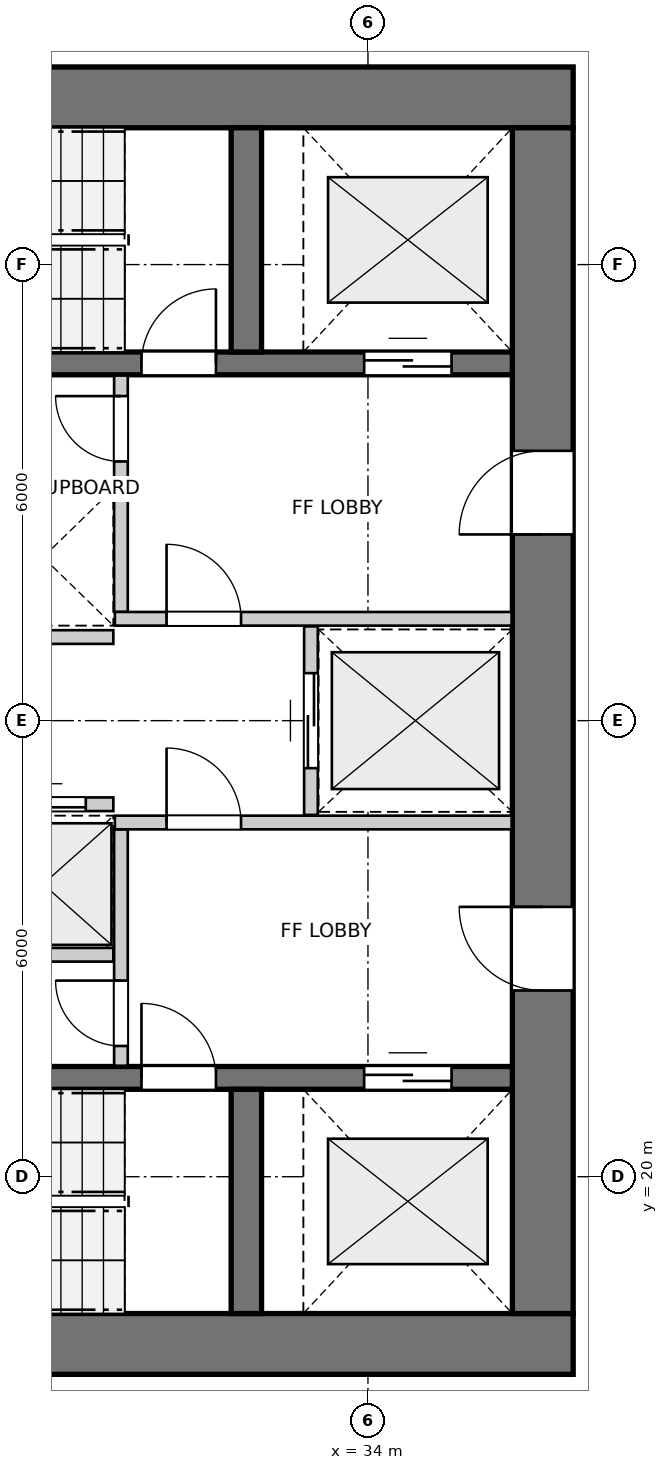
"""IFC4 building model, lengths in metres.
Left out: names, types, materials, properties, quantities, classifications, styles, units other than length and angle.
Written with IfcOpenShell. Run it as: python <this file> out.ifc"""

import sys

from ifc_helpers import new_model, si_unit, direction, frame, frame_2d, origin, place, context, subcontext, project, spatial, rectangle, extrude, source, transform, mapped, element, fill, save


model = new_model("IFC4")
c1 = context("Model", 3, precision=1e-05, world=origin(), true_north=direction((0.0, 1.0)))
c2 = subcontext(c1, "Body", "Model", "MODEL_VIEW")
j1 = project(units=[si_unit("LENGTHUNIT", "METRE"), si_unit("PLANEANGLEUNIT", "RADIAN")], contexts=[c1])
p1 = place(None, origin())
s1 = spatial("IfcSite", under=j1, at=p1, CompositionType="ELEMENT")
p2 = place(p1, origin())
s2 = spatial("IfcBuilding", under=s1, at=p2, CompositionType="ELEMENT")
p3 = place(p2, frame((0.0, 0.0, 17.4)))
s3 = spatial("IfcBuildingStorey", under=s2, at=p3, CompositionType="ELEMENT", Elevation=17.4)
for number, where, z_axis, x_axis in (
    (1, (24.0, 17.8, 0.0), (0.0, 0.0, 1.0), (1.0, 0.0, 0.0)),
    (2, (36.7, 34.2, 0.0), (0.0, 0.0, 1.0), (-1.0, 0.0, 0.0)),
):
    element("IfcWall", number, at=place(p3, frame(where, z_axis=z_axis, x_axis=x_axis)), inside=s3, PredefinedType="SHEAR", context=c2, shape_type="SweptSolid", body=[
        extrude(rectangle(XDim=12.7, YDim=0.8, at=frame_2d((6.35, 0.0))), origin(), (0.0, 0.0, 1.0), 2.94),
    ])
p4 = place(p3, frame((36.3, 18.2, 0.0), z_axis=(0.0, 0.0, 1.0), x_axis=(0.0, 1.0, 0.0)))
e3 = element("IfcWall", 3, at=p4, inside=s3, PredefinedType="SHEAR", context=c2, shape_type="SweptSolid", body=[
    extrude(rectangle(XDim=15.6, YDim=0.8, at=frame_2d((7.8, 0.0))), origin(), (0.0, 0.0, 1.0), 2.94),
])
p5 = place(p4, frame((4.25, 0.0, 0.0)))
e4 = element("IfcOpeningElement", 4, at=p5, cuts=e3, PredefinedType="OPENING", context=c2, shape_type="SweptSolid", body=[
    extrude(rectangle(XDim=1.1, YDim=2.15, at=frame_2d((0.55, 1.075))), frame((0.0, 0.41, 0.0), z_axis=(0.0, -1.0, 0.0), x_axis=(1.0, 0.0, 0.0)), (0.0, 0.0, 1.0), 0.82),
])
p6 = place(p4, frame((10.25, 0.0, 0.0)))
e5 = element("IfcOpeningElement", 5, at=p6, cuts=e3, PredefinedType="OPENING", context=c2, shape_type="SweptSolid", body=[
    extrude(rectangle(XDim=1.1, YDim=2.15, at=frame_2d((0.55, 1.075))), frame((0.0, 0.41, 0.0), z_axis=(0.0, -1.0, 0.0), x_axis=(1.0, 0.0, 0.0)), (0.0, 0.0, 1.0), 0.82),
])
p7 = place(p3, frame((24.8, 21.3, 0.0), z_axis=(0.0, 0.0, 1.0), x_axis=(1.0, 0.0, 0.0)))
e6 = element("IfcWall", 6, at=p7, inside=s3, PredefinedType="SHEAR", context=c2, shape_type="SweptSolid", body=[
    extrude(rectangle(XDim=11.1, YDim=0.3, at=frame_2d((5.55, 0.0))), origin(), (0.0, 0.0, 1.0), 2.94),
])
p8 = place(p7, frame((6.22, 0.0, 0.0)))
e7 = element("IfcOpeningElement", 7, at=p8, cuts=e6, PredefinedType="OPENING", context=c2, shape_type="SweptSolid", body=[
    extrude(rectangle(XDim=0.98, YDim=2.15, at=frame_2d((0.49, 1.075))), frame((0.0, 0.16, 0.0), z_axis=(0.0, -1.0, 0.0), x_axis=(1.0, 0.0, 0.0)), (0.0, 0.0, 1.0), 0.32),
])
p9 = place(p7, frame((9.15, 0.0, 0.0)))
e8 = element("IfcOpeningElement", 8, at=p9, cuts=e6, PredefinedType="OPENING", context=c2, shape_type="SweptSolid", body=[
    extrude(rectangle(XDim=1.15, YDim=2.15, at=frame_2d((0.575, 1.075))), frame((0.0, 0.16, 0.0), z_axis=(0.0, -1.0, 0.0), x_axis=(1.0, 0.0, 0.0)), (0.0, 0.0, 1.0), 0.32),
])
p10 = place(p3, frame((32.4, 18.2, 0.0), z_axis=(0.0, 0.0, 1.0), x_axis=(0.0, 1.0, 0.0)))
e9 = element("IfcWall", 9, at=p10, inside=s3, PredefinedType="SHEAR", context=c2, shape_type="SweptSolid", body=[
    extrude(rectangle(XDim=2.95, YDim=0.4, at=frame_2d((1.475, 0.0))), origin(), (0.0, 0.0, 1.0), 2.94),
])
p11 = place(p3, frame((24.8, 30.7, 0.0), z_axis=(0.0, 0.0, 1.0), x_axis=(1.0, 0.0, 0.0)))
e10 = element("IfcWall", 10, at=p11, inside=s3, PredefinedType="SHEAR", context=c2, shape_type="SweptSolid", body=[
    extrude(rectangle(XDim=11.1, YDim=0.3, at=frame_2d((5.55, 0.0))), origin(), (0.0, 0.0, 1.0), 2.94),
])
p12 = place(p11, frame((6.22, 0.0, 0.0)))
e11 = element("IfcOpeningElement", 11, at=p12, cuts=e10, PredefinedType="OPENING", context=c2, shape_type="SweptSolid", body=[
    extrude(rectangle(XDim=0.98, YDim=2.15, at=frame_2d((0.49, 1.075))), frame((0.0, 0.16, 0.0), z_axis=(0.0, -1.0, 0.0), x_axis=(1.0, 0.0, 0.0)), (0.0, 0.0, 1.0), 0.32),
])
p13 = place(p11, frame((9.15, 0.0, 0.0)))
e12 = element("IfcOpeningElement", 12, at=p13, cuts=e10, PredefinedType="OPENING", context=c2, shape_type="SweptSolid", body=[
    extrude(rectangle(XDim=1.15, YDim=2.15, at=frame_2d((0.575, 1.075))), frame((0.0, 0.16, 0.0), z_axis=(0.0, -1.0, 0.0), x_axis=(1.0, 0.0, 0.0)), (0.0, 0.0, 1.0), 0.32),
])
p14 = place(p3, frame((32.4, 30.85, 0.0), z_axis=(0.0, 0.0, 1.0), x_axis=(0.0, 1.0, 0.0)))
e13 = element("IfcWall", 13, at=p14, inside=s3, PredefinedType="SHEAR", context=c2, shape_type="SweptSolid", body=[
    extrude(rectangle(XDim=2.95, YDim=0.4, at=frame_2d((1.475, 0.0))), origin(), (0.0, 0.0, 1.0), 2.94),
])
p15 = place(p3, frame((30.75, 21.46, 0.0), z_axis=(0.0, 0.0, 1.0), x_axis=(0.0, 1.0, 0.0)))
e14 = element("IfcWall", 14, at=p15, inside=s3, PredefinedType="PARTITIONING", context=c2, shape_type="SweptSolid", body=[
    extrude(rectangle(XDim=3.11, YDim=0.18, at=frame_2d((1.555, 0.0))), origin(), (0.0, 0.0, 1.0), 2.94),
])
p16 = place(p15, frame((0.26, 0.0, 0.0)))
e15 = element("IfcOpeningElement", 15, at=p16, cuts=e14, PredefinedType="OPENING", context=c2, shape_type="SweptSolid", body=[
    extrude(rectangle(XDim=0.86, YDim=2.05, at=frame_2d((0.43, 1.025))), frame((0.0, 0.1, 0.0), z_axis=(0.0, -1.0, 0.0), x_axis=(1.0, 0.0, 0.0)), (0.0, 0.0, 1.0), 0.2),
])
p17 = place(p3, frame((30.67, 24.66, 0.0), z_axis=(0.0, 0.0, 1.0), x_axis=(1.0, 0.0, 0.0)))
e16 = element("IfcWall", 16, at=p17, inside=s3, PredefinedType="PARTITIONING", context=c2, shape_type="SweptSolid", body=[
    extrude(rectangle(XDim=5.22, YDim=0.18, at=frame_2d((2.61, 0.0))), origin(), (0.0, 0.0, 1.0), 2.94),
])
p18 = place(p17, frame((0.68, 0.0, 0.0)))
e17 = element("IfcOpeningElement", 17, at=p18, cuts=e16, PredefinedType="OPENING", context=c2, shape_type="SweptSolid", body=[
    extrude(rectangle(XDim=0.98, YDim=2.15, at=frame_2d((0.49, 1.075))), frame((0.0, 0.1, 0.0), z_axis=(0.0, -1.0, 0.0), x_axis=(1.0, 0.0, 0.0)), (0.0, 0.0, 1.0), 0.2),
])
p19 = place(p3, frame((30.75, 27.43, 0.0), z_axis=(0.0, 0.0, 1.0), x_axis=(0.0, 1.0, 0.0)))
e18 = element("IfcWall", 18, at=p19, inside=s3, PredefinedType="PARTITIONING", context=c2, shape_type="SweptSolid", body=[
    extrude(rectangle(XDim=3.11, YDim=0.18, at=frame_2d((1.555, 0.0))), origin(), (0.0, 0.0, 1.0), 2.94),
])
p20 = place(p19, frame((1.98, 0.0, 0.0)))
e19 = element("IfcOpeningElement", 19, at=p20, cuts=e18, PredefinedType="OPENING", context=c2, shape_type="SweptSolid", body=[
    extrude(rectangle(XDim=0.86, YDim=2.05, at=frame_2d((0.43, 1.025))), frame((0.0, 0.1, 0.0), z_axis=(0.0, -1.0, 0.0), x_axis=(1.0, 0.0, 0.0)), (0.0, 0.0, 1.0), 0.2),
])
p21 = place(p3, frame((30.67, 27.34, 0.0), z_axis=(0.0, 0.0, 1.0), x_axis=(1.0, 0.0, 0.0)))
e20 = element("IfcWall", 20, at=p21, inside=s3, PredefinedType="PARTITIONING", context=c2, shape_type="SweptSolid", body=[
    extrude(rectangle(XDim=5.22, YDim=0.18, at=frame_2d((2.61, 0.0))), origin(), (0.0, 0.0, 1.0), 2.94),
])
p22 = place(p21, frame((0.68, 0.0, 0.0)))
e21 = element("IfcOpeningElement", 21, at=p22, cuts=e20, PredefinedType="OPENING", context=c2, shape_type="SweptSolid", body=[
    extrude(rectangle(XDim=0.98, YDim=2.15, at=frame_2d((0.49, 1.075))), frame((0.0, 0.1, 0.0), z_axis=(0.0, -1.0, 0.0), x_axis=(1.0, 0.0, 0.0)), (0.0, 0.0, 1.0), 0.2),
])
p23 = place(p3, frame((33.25, 24.76, 0.0), z_axis=(0.0, 0.0, 1.0), x_axis=(0.0, 1.0, 0.0)))
e22 = element("IfcWall", 22, at=p23, inside=s3, PredefinedType="PARTITIONING", context=c2, shape_type="SweptSolid", body=[
    extrude(rectangle(XDim=2.48, YDim=0.18, at=frame_2d((1.24, 0.0))), origin(), (0.0, 0.0, 1.0), 2.94),
])
p24 = place(p23, frame((0.615, 0.0, 0.0)))
e23 = element("IfcOpeningElement", 23, at=p24, cuts=e22, PredefinedType="OPENING", context=c2, shape_type="SweptSolid", body=[
    extrude(rectangle(XDim=1.25, YDim=2.15, at=frame_2d((0.625, 1.075))), frame((0.0, 0.1, 0.0), z_axis=(0.0, -1.0, 0.0), x_axis=(1.0, 0.0, 0.0)), (0.0, 0.0, 1.0), 0.2),
])
p25 = place(p3, frame((24.81, 22.92, 0.0), z_axis=(0.0, 0.0, 1.0), x_axis=(1.0, 0.0, 0.0)))
e24 = element("IfcWall", 24, at=p25, inside=s3, PredefinedType="PARTITIONING", context=c2, shape_type="SweptSolid", body=[
    extrude(rectangle(XDim=5.84, YDim=0.18, at=frame_2d((2.92, 0.0))), origin(), (0.0, 0.0, 1.0), 2.94),
])
p26 = place(p3, frame((28.825, 24.9, 0.0), z_axis=(0.0, 0.0, 1.0), x_axis=(1.0, 0.0, 0.0)))
e25 = element("IfcWall", 25, at=p26, inside=s3, PredefinedType="PARTITIONING", context=c2, shape_type="SweptSolid", body=[
    extrude(rectangle(XDim=1.825, YDim=0.18, at=frame_2d((0.913, 0.0))), origin(), (0.0, 0.0, 1.0), 2.94),
])
p27 = place(p26, frame((0.363, 0.0, 0.0)))
e26 = element("IfcOpeningElement", 26, at=p27, cuts=e25, PredefinedType="OPENING", context=c2, shape_type="SweptSolid", body=[
    extrude(rectangle(XDim=1.1, YDim=2.15, at=frame_2d((0.55, 1.075))), frame((0.0, 0.1, 0.0), z_axis=(0.0, -1.0, 0.0), x_axis=(1.0, 0.0, 0.0)), (0.0, 0.0, 1.0), 0.2),
])
p28 = place(p3, frame((24.81, 29.08, 0.0), z_axis=(0.0, 0.0, 1.0), x_axis=(1.0, 0.0, 0.0)))
e27 = element("IfcWall", 27, at=p28, inside=s3, PredefinedType="PARTITIONING", context=c2, shape_type="SweptSolid", body=[
    extrude(rectangle(XDim=5.84, YDim=0.18, at=frame_2d((2.92, 0.0))), origin(), (0.0, 0.0, 1.0), 2.94),
])
p29 = place(p3, frame((28.825, 27.1, 0.0), z_axis=(0.0, 0.0, 1.0), x_axis=(1.0, 0.0, 0.0)))
e28 = element("IfcWall", 28, at=p29, inside=s3, PredefinedType="PARTITIONING", context=c2, shape_type="SweptSolid", body=[
    extrude(rectangle(XDim=1.825, YDim=0.18, at=frame_2d((0.913, 0.0))), origin(), (0.0, 0.0, 1.0), 2.94),
])
m1 = source(origin(), c2, "Body", "SweptSolid", [
    extrude(rectangle(XDim=0.98, YDim=2.15, at=frame_2d((0.49, 1.075))), frame((0.0, 0.025, 0.0), z_axis=(0.0, -1.0, 0.0), x_axis=(1.0, 0.0, 0.0)), (0.0, 0.0, 1.0), 0.05),
])
p30 = place(p8, origin())
e29 = element("IfcDoor", 29, at=p30, inside=s3, OperationType="SINGLE_SWING_LEFT", PredefinedType="DOOR", context=c2, shape_type="MappedRepresentation", body=[
    mapped(m1, transform((0.0, 0.0, 0.0), x_axis=(1.0, 0.0, 0.0), y_axis=(0.0, 1.0, 0.0), z_axis=(0.0, 0.0, 1.0), scale=1.0)),
])
fill(e7, e29)
m2 = source(origin(), c2, "Body", "SweptSolid", [
    extrude(rectangle(XDim=1.15, YDim=2.15, at=frame_2d((0.575, 1.075))), frame((0.0, 0.025, 0.0), z_axis=(0.0, -1.0, 0.0), x_axis=(1.0, 0.0, 0.0)), (0.0, 0.0, 1.0), 0.05),
])
p31 = place(p9, origin())
e30 = element("IfcDoor", 30, at=p31, inside=s3, OperationType="DOUBLE_DOOR_SLIDING", PredefinedType="DOOR", context=c2, shape_type="MappedRepresentation", body=[
    mapped(m2, transform((0.0, 0.0, 0.0), x_axis=(1.0, 0.0, 0.0), y_axis=(0.0, 1.0, 0.0), z_axis=(0.0, 0.0, 1.0), scale=1.0)),
])
fill(e8, e30)
p32 = place(p12, origin())
e31 = element("IfcDoor", 31, at=p32, inside=s3, OperationType="SINGLE_SWING_RIGHT", PredefinedType="DOOR", context=c2, shape_type="MappedRepresentation", body=[
    mapped(m1, transform((0.0, 0.0, 0.0), x_axis=(1.0, 0.0, 0.0), y_axis=(0.0, 1.0, 0.0), z_axis=(0.0, 0.0, 1.0), scale=1.0)),
])
fill(e11, e31)
p33 = place(p13, origin())
e32 = element("IfcDoor", 32, at=p33, inside=s3, OperationType="DOUBLE_DOOR_SLIDING", PredefinedType="DOOR", context=c2, shape_type="MappedRepresentation", body=[
    mapped(m2, transform((0.0, 0.0, 0.0), x_axis=(1.0, 0.0, 0.0), y_axis=(0.0, 1.0, 0.0), z_axis=(0.0, 0.0, 1.0), scale=1.0)),
])
fill(e12, e32)
m3 = source(origin(), c2, "Body", "SweptSolid", [
    extrude(rectangle(XDim=1.1, YDim=2.15, at=frame_2d((0.55, 1.075))), frame((0.0, 0.025, 0.0), z_axis=(0.0, -1.0, 0.0), x_axis=(1.0, 0.0, 0.0)), (0.0, 0.0, 1.0), 0.05),
])
p34 = place(p5, origin())
e33 = element("IfcDoor", 33, at=p34, inside=s3, OperationType="SINGLE_SWING_RIGHT", PredefinedType="DOOR", context=c2, shape_type="MappedRepresentation", body=[
    mapped(m3, transform((0.0, 0.0, 0.0), x_axis=(1.0, 0.0, 0.0), y_axis=(0.0, 1.0, 0.0), z_axis=(0.0, 0.0, 1.0), scale=1.0)),
])
fill(e4, e33)
p35 = place(p6, origin())
e34 = element("IfcDoor", 34, at=p35, inside=s3, OperationType="SINGLE_SWING_LEFT", PredefinedType="DOOR", context=c2, shape_type="MappedRepresentation", body=[
    mapped(m3, transform((0.0, 0.0, 0.0), x_axis=(1.0, 0.0, 0.0), y_axis=(0.0, 1.0, 0.0), z_axis=(0.0, 0.0, 1.0), scale=1.0)),
])
fill(e5, e34)
m4 = source(origin(), c2, "Body", "SweptSolid", [
    extrude(rectangle(XDim=0.86, YDim=2.05, at=frame_2d((0.43, 1.025))), frame((0.0, 0.025, 0.0), z_axis=(0.0, -1.0, 0.0), x_axis=(1.0, 0.0, 0.0)), (0.0, 0.0, 1.0), 0.05),
])
p36 = place(p16, origin())
e35 = element("IfcDoor", 35, at=p36, inside=s3, OperationType="SINGLE_SWING_RIGHT", PredefinedType="DOOR", context=c2, shape_type="MappedRepresentation", body=[
    mapped(m4, transform((0.0, 0.0, 0.0), x_axis=(1.0, 0.0, 0.0), y_axis=(0.0, 1.0, 0.0), z_axis=(0.0, 0.0, 1.0), scale=1.0)),
])
fill(e15, e35)
p37 = place(p18, origin())
e36 = element("IfcDoor", 36, at=p37, inside=s3, OperationType="SINGLE_SWING_LEFT", PredefinedType="DOOR", context=c2, shape_type="MappedRepresentation", body=[
    mapped(m1, transform((0.0, 0.0, 0.0), x_axis=(1.0, 0.0, 0.0), y_axis=(0.0, 1.0, 0.0), z_axis=(0.0, 0.0, 1.0), scale=1.0)),
])
fill(e17, e36)
p38 = place(p20, origin())
e37 = element("IfcDoor", 37, at=p38, inside=s3, OperationType="SINGLE_SWING_RIGHT", PredefinedType="DOOR", context=c2, shape_type="MappedRepresentation", body=[
    mapped(m4, transform((0.0, 0.0, 0.0), x_axis=(1.0, 0.0, 0.0), y_axis=(0.0, 1.0, 0.0), z_axis=(0.0, 0.0, 1.0), scale=1.0)),
])
fill(e19, e37)
p39 = place(p22, origin())
e38 = element("IfcDoor", 38, at=p39, inside=s3, OperationType="SINGLE_SWING_LEFT", PredefinedType="DOOR", context=c2, shape_type="MappedRepresentation", body=[
    mapped(m1, transform((0.0, 0.0, 0.0), x_axis=(1.0, 0.0, 0.0), y_axis=(0.0, 1.0, 0.0), z_axis=(0.0, 0.0, 1.0), scale=1.0)),
])
fill(e21, e38)
m5 = source(origin(), c2, "Body", "SweptSolid", [
    extrude(rectangle(XDim=1.25, YDim=2.15, at=frame_2d((0.625, 1.075))), frame((0.0, 0.025, 0.0), z_axis=(0.0, -1.0, 0.0), x_axis=(1.0, 0.0, 0.0)), (0.0, 0.0, 1.0), 0.05),
])
p40 = place(p24, origin())
e39 = element("IfcDoor", 39, at=p40, inside=s3, OperationType="DOUBLE_DOOR_SLIDING", PredefinedType="DOOR", context=c2, shape_type="MappedRepresentation", body=[
    mapped(m5, transform((0.0, 0.0, 0.0), x_axis=(1.0, 0.0, 0.0), y_axis=(0.0, 1.0, 0.0), z_axis=(0.0, 0.0, 1.0), scale=1.0)),
])
fill(e23, e39)
p41 = place(p27, origin())
e40 = element("IfcDoor", 40, at=p41, inside=s3, OperationType="DOUBLE_DOOR_SLIDING", PredefinedType="DOOR", context=c2, shape_type="MappedRepresentation", body=[
    mapped(m3, transform((0.0, 0.0, 0.0), x_axis=(1.0, 0.0, 0.0), y_axis=(0.0, 1.0, 0.0), z_axis=(0.0, 0.0, 1.0), scale=1.0)),
])
fill(e26, e40)
save(model, sys.argv[1])
